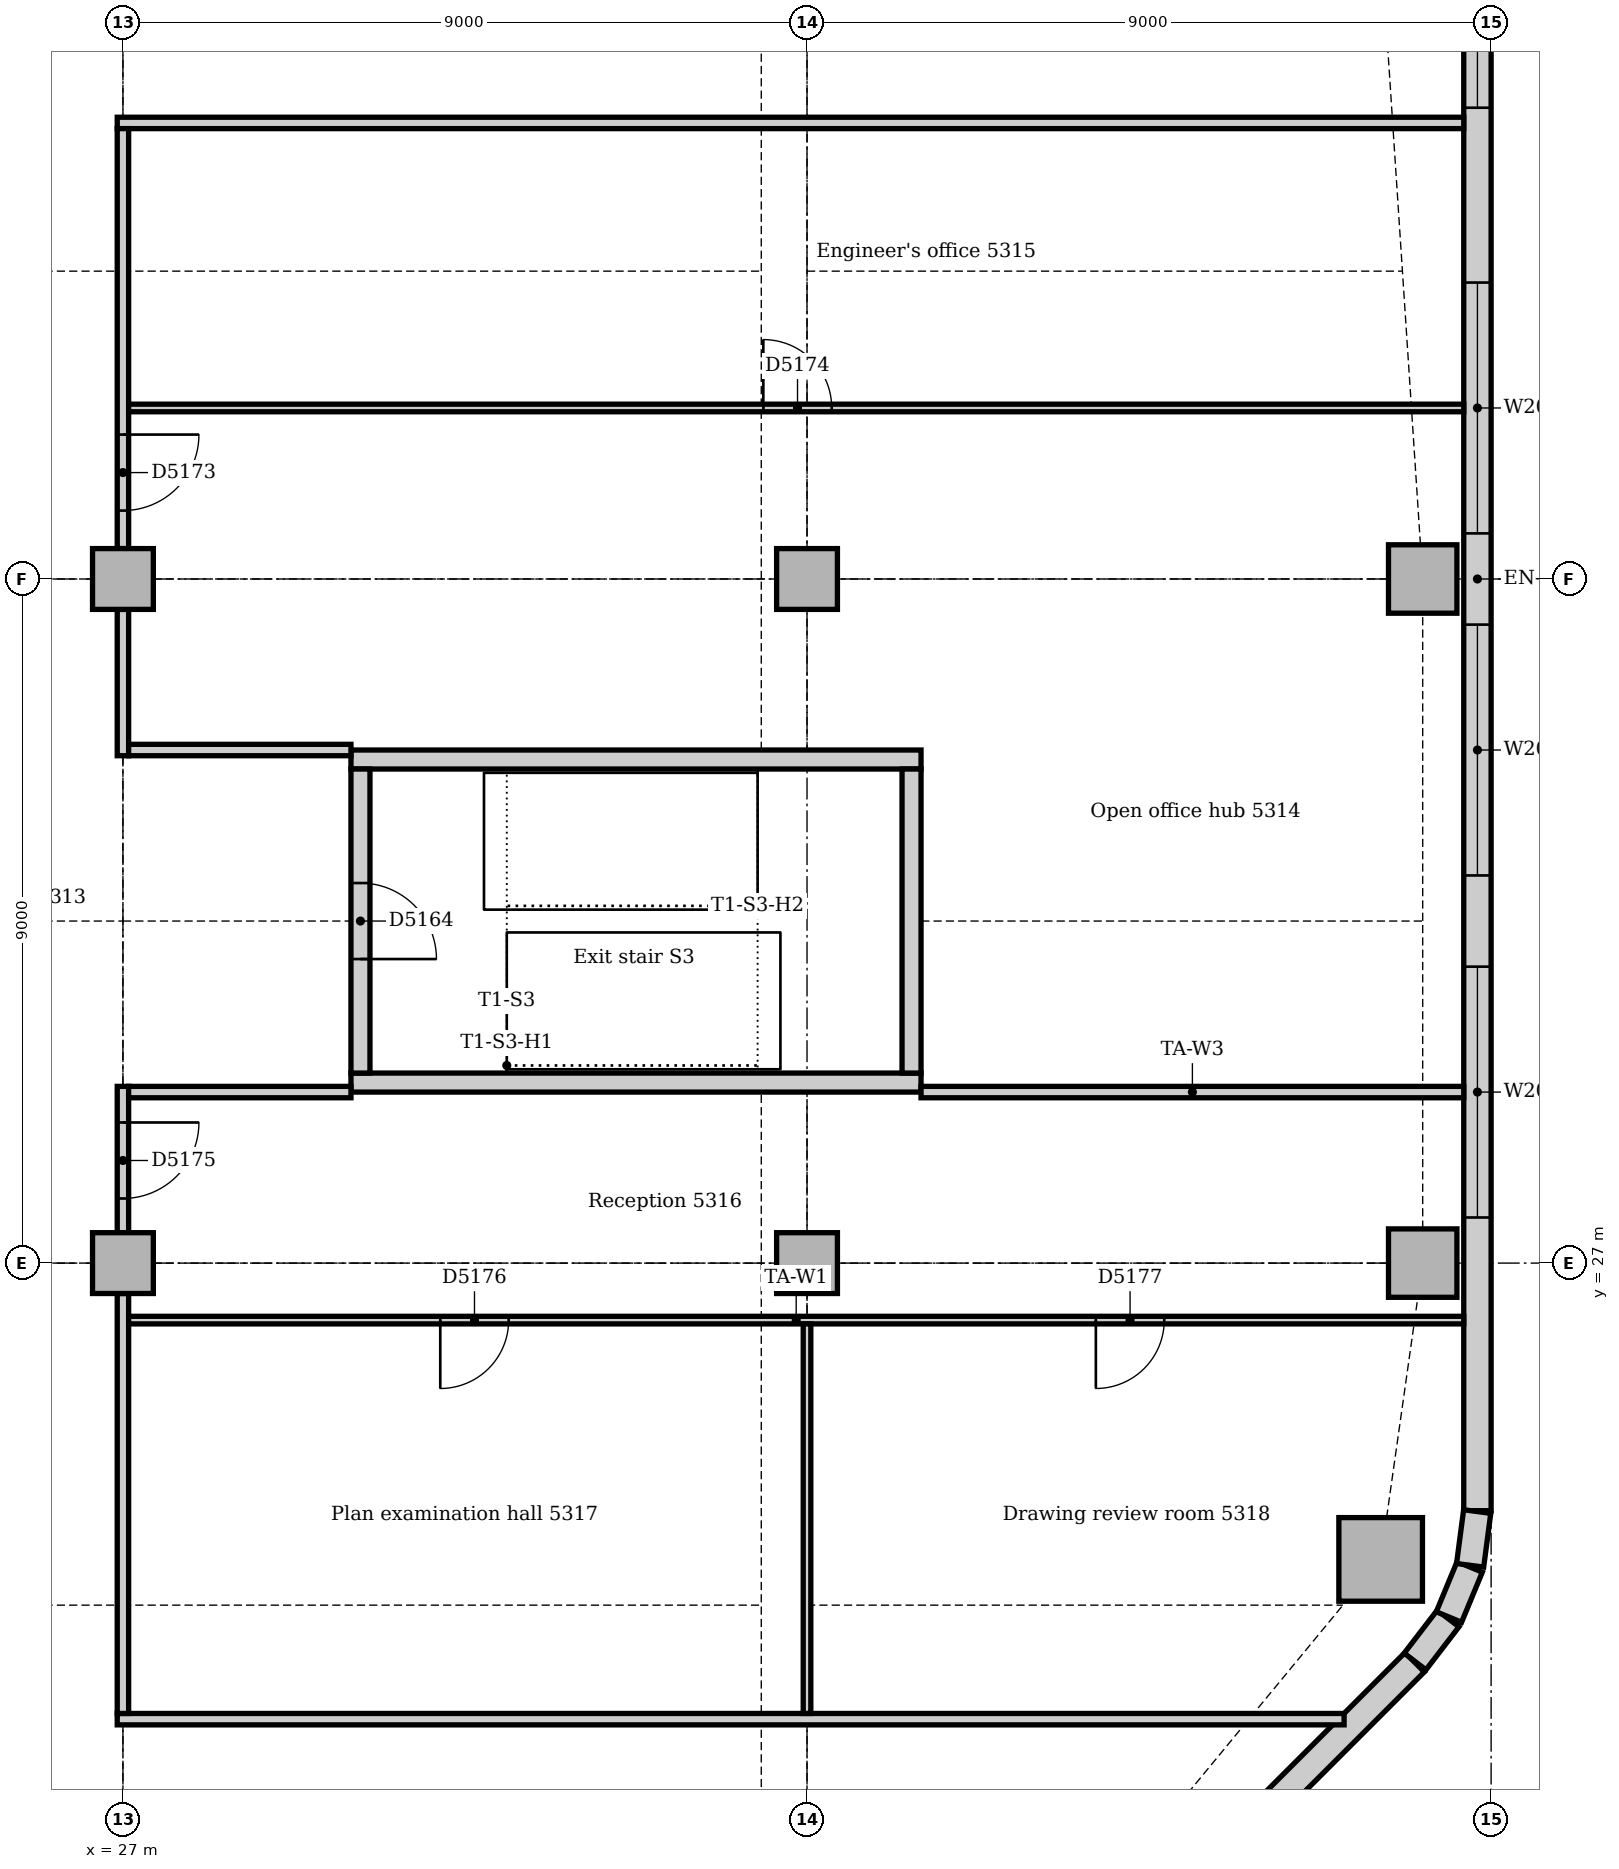
"""IFC4 building model, lengths in metres.
Left out: names, types, materials, properties, quantities, classifications, styles, units other than length and angle.
Written with IfcOpenShell. Run it as: python <this file> out.ifc"""

import sys

from ifc_helpers import new_model, si_unit, direction, frame, frame_2d, origin, origin_2d, place, context, subcontext, project, spatial, rectangle, extrude, element, fill, save


model = new_model("IFC4")
c1 = context("Model", 3, precision=1e-05, world=origin(), true_north=direction((0.0, 1.0)))
c2 = subcontext(c1, "Body", "Model", "MODEL_VIEW")
j1 = project(units=[si_unit("LENGTHUNIT", "METRE"), si_unit("PLANEANGLEUNIT", "RADIAN")], contexts=[c1])
p1 = place(None, origin())
s1 = spatial("IfcSite", under=j1, at=p1, CompositionType="ELEMENT")
p2 = place(p1, origin())
s2 = spatial("IfcBuilding", under=s1, at=p2, CompositionType="ELEMENT")
p3 = place(p2, frame((0.0, 0.0, 222.0)))
s3 = spatial("IfcBuildingStorey", under=s2, at=p3, CompositionType="ELEMENT", Elevation=222.0)
for number, where, z_axis, x_axis in (
    (1, (30.0, 29.375, 0.0), (0.0, 0.0, 1.0), (1.0, 0.0, 0.0)),
    (2, (37.5, 33.625, 0.0), (0.0, 0.0, 1.0), (-1.0, 0.0, 0.0)),
):
    element("IfcWall", number, at=place(p3, frame(where, z_axis=z_axis, x_axis=x_axis)), inside=s3, PredefinedType="SOLIDWALL", context=c2, shape_type="SweptSolid", body=[
        extrude(rectangle(XDim=7.5, YDim=0.25, at=frame_2d((3.75, 0.0))), origin(), (0.0, 0.0, 1.0), 4.0),
    ])
p4 = place(p3, frame((37.375, 29.5, 0.0), z_axis=(0.0, 0.0, 1.0), x_axis=(0.0, 1.0, 0.0)))
e3 = element("IfcWall", 3, at=p4, inside=s3, PredefinedType="SOLIDWALL", context=c2, shape_type="SweptSolid", body=[
    extrude(rectangle(XDim=4.0, YDim=0.25, at=frame_2d((2.0, 0.0))), origin(), (0.0, 0.0, 1.0), 4.0),
])
p5 = place(p3, frame((30.125, 33.5, 0.0), z_axis=(0.0, 0.0, 1.0), x_axis=(0.0, -1.0, 0.0)))
e4 = element("IfcWall", 4, at=p5, inside=s3, PredefinedType="SOLIDWALL", context=c2, shape_type="SweptSolid", body=[
    extrude(rectangle(XDim=4.0, YDim=0.25, at=frame_2d((2.0, 0.0))), origin(), (0.0, 0.0, 1.0), 4.0),
])
p6 = place(p5, frame((1.5, 0.0, 0.0)))
e5 = element("IfcOpeningElement", 5, at=p6, cuts=e4, PredefinedType="OPENING", context=c2, shape_type="SweptSolid", body=[
    extrude(rectangle(XDim=1.0, YDim=2.1, at=frame_2d((0.5, 1.05))), frame((0.0, 0.135, 0.0), z_axis=(0.0, -1.0, 0.0), x_axis=(1.0, 0.0, 0.0)), (0.0, 0.0, 1.0), 0.27),
])
p7 = place(p3, frame((43.547, 23.102, 0.0), z_axis=(0.0, 0.0, 1.0), x_axis=(1.0, 0.0, 0.0)))
e6 = element("IfcColumn", 6, at=p7, inside=s3, PredefinedType="COLUMN", context=c2, shape_type="SweptSolid", body=[
    extrude(rectangle(XDim=1.1, YDim=1.1, at=origin_2d()), origin(), (0.0, 0.0, 1.0), 3.85),
])
for number, where, z_axis, x_axis in (
    (7, (44.1, 27.0, 0.0), (0.0, 0.0, 1.0), (1.0, 0.0, 0.0)),
    (8, (44.1, 36.0, 0.0), (0.0, 0.0, 1.0), (1.0, 0.0, 0.0)),
):
    element("IfcColumn", number, at=place(p3, frame(where, z_axis=z_axis, x_axis=x_axis)), inside=s3, PredefinedType="COLUMN", context=c2, shape_type="SweptSolid", body=[
        extrude(rectangle(XDim=0.9, YDim=0.9, at=origin_2d()), origin(), (0.0, 0.0, 1.0), 3.85),
    ])
for number, where, z_axis, x_axis in (
    (9, (27.0, 27.0, 0.0), (0.0, 0.0, 1.0), (1.0, 0.0, 0.0)),
    (10, (27.0, 36.0, 0.0), (0.0, 0.0, 1.0), (1.0, 0.0, 0.0)),
    (11, (36.0, 27.0, 0.0), (0.0, 0.0, 1.0), (1.0, 0.0, 0.0)),
    (12, (36.0, 36.0, 0.0), (0.0, 0.0, 1.0), (1.0, 0.0, 0.0)),
):
    element("IfcColumn", number, at=place(p3, frame(where, z_axis=z_axis, x_axis=x_axis)), inside=s3, PredefinedType="COLUMN", context=c2, shape_type="SweptSolid", body=[
        extrude(rectangle(XDim=0.8, YDim=0.8, at=origin_2d()), origin(), (0.0, 0.0, 1.0), 3.85),
    ])
p8 = place(p3, frame((36.751, 14.506, 0.0), z_axis=(0.0, 0.0, 1.0), x_axis=(0.707106781187, 0.707106781187, 0.0)))
e13 = element("IfcWall", 13, at=p8, inside=s3, PredefinedType="STANDARD", context=c2, shape_type="SweptSolid", body=[
    extrude(rectangle(XDim=10.243, YDim=0.36, at=frame_2d((5.121, 0.0))), origin(), (0.0, 0.0, 1.0), 3.85),
])
p9 = place(p8, frame((5.021, 0.0, 0.9)))
e14 = element("IfcOpeningElement", 14, at=p9, cuts=e13, PredefinedType="OPENING", context=c2, shape_type="SweptSolid", body=[
    extrude(rectangle(XDim=1.8, YDim=1.6, at=frame_2d((0.9, 0.8))), frame((0.0, 0.19, 0.0), z_axis=(0.0, -1.0, 0.0), x_axis=(1.0, 0.0, 0.0)), (0.0, 0.0, 1.0), 0.38),
])
p10 = place(p3, frame((44.82, 23.743, 0.0), z_axis=(0.0, 0.0, 1.0), x_axis=(0.0, 1.0, 0.0)))
e15 = element("IfcWall", 15, at=p10, inside=s3, PredefinedType="STANDARD", context=c2, shape_type="SweptSolid", body=[
    extrude(rectangle(XDim=24.515, YDim=0.36, at=frame_2d((12.257, 0.0))), origin(), (0.0, 0.0, 1.0), 3.85),
])
p11 = place(p10, frame((3.857, 0.0, 0.9)))
e16 = element("IfcOpeningElement", 16, at=p11, cuts=e15, PredefinedType="OPENING", context=c2, shape_type="SweptSolid", body=[
    extrude(rectangle(XDim=3.3, YDim=1.6, at=frame_2d((1.65, 0.8))), frame((0.0, 0.19, 0.0), z_axis=(0.0, -1.0, 0.0), x_axis=(1.0, 0.0, 0.0)), (0.0, 0.0, 1.0), 0.38),
])
p12 = place(p10, frame((8.357, 0.0, 0.9)))
e17 = element("IfcOpeningElement", 17, at=p12, cuts=e15, PredefinedType="OPENING", context=c2, shape_type="SweptSolid", body=[
    extrude(rectangle(XDim=3.3, YDim=1.6, at=frame_2d((1.65, 0.8))), frame((0.0, 0.19, 0.0), z_axis=(0.0, -1.0, 0.0), x_axis=(1.0, 0.0, 0.0)), (0.0, 0.0, 1.0), 0.38),
])
p13 = place(p10, frame((12.857, 0.0, 0.9)))
e18 = element("IfcOpeningElement", 18, at=p13, cuts=e15, PredefinedType="OPENING", context=c2, shape_type="SweptSolid", body=[
    extrude(rectangle(XDim=3.3, YDim=1.6, at=frame_2d((1.65, 0.8))), frame((0.0, 0.19, 0.0), z_axis=(0.0, -1.0, 0.0), x_axis=(1.0, 0.0, 0.0)), (0.0, 0.0, 1.0), 0.38),
])
p14 = place(p10, frame((18.457, 0.0, 0.9)))
e19 = element("IfcOpeningElement", 19, at=p14, cuts=e15, PredefinedType="OPENING", context=c2, shape_type="SweptSolid", body=[
    extrude(rectangle(XDim=1.8, YDim=1.6, at=frame_2d((0.9, 0.8))), frame((0.0, 0.19, 0.0), z_axis=(0.0, -1.0, 0.0), x_axis=(1.0, 0.0, 0.0)), (0.0, 0.0, 1.0), 0.38),
])
p15 = place(p3, frame((44.0, 21.759, 0.0), z_axis=(0.0, 0.0, 1.0), x_axis=(0.608802368033, 0.793321924995, 0.0)))
e20 = element("IfcWall", 20, at=p15, inside=s3, PredefinedType="STANDARD", context=c2, shape_type="SweptSolid", body=[
    extrude(rectangle(XDim=0.713, YDim=0.36, at=frame_2d((0.357, 0.0))), origin(), (0.0, 0.0, 1.0), 3.85),
])
for number, where, z_axis, x_axis in (
    (21, (44.445, 22.344, 0.0), (0.0, 0.0, 1.0), (0.383, 0.924, 0.0)),
    (22, (44.724, 23.024, 0.0), (0.0, 0.0, 1.0), (0.131, 0.991, 0.0)),
):
    element("IfcWall", number, at=place(p3, frame(where, z_axis=z_axis, x_axis=x_axis)), inside=s3, PredefinedType="STANDARD", context=c2, shape_type="SweptSolid", body=[
        extrude(rectangle(XDim=0.713, YDim=0.36, at=frame_2d((0.356, 0.0))), origin(), (0.0, 0.0, 1.0), 3.85),
    ])
p16 = place(p3, frame((26.925, 42.0, 0.0), z_axis=(0.0, 0.0, 1.0), x_axis=(1.0, 0.0, 0.0)))
e23 = element("IfcWall", 23, at=p16, inside=s3, PredefinedType="PARTITIONING", context=c2, shape_type="SweptSolid", body=[
    extrude(rectangle(XDim=17.715, YDim=0.15, at=frame_2d((8.857, 0.0))), origin(), (0.0, 0.0, 1.0), 3.85),
])
p17 = place(p3, frame((26.925, 21.0, 0.0), z_axis=(0.0, 0.0, 1.0), x_axis=(1.0, 0.0, 0.0)))
e24 = element("IfcWall", 24, at=p17, inside=s3, PredefinedType="PARTITIONING", context=c2, shape_type="SweptSolid", body=[
    extrude(rectangle(XDim=16.141, YDim=0.15, at=frame_2d((8.07, 0.0))), origin(), (0.0, 0.0, 1.0), 3.85),
])
p18 = place(p3, frame((27.0, 21.075, 0.0), z_axis=(0.0, 0.0, 1.0), x_axis=(0.0, 1.0, 0.0)))
e25 = element("IfcWall", 25, at=p18, inside=s3, PredefinedType="PARTITIONING", context=c2, shape_type="SweptSolid", body=[
    extrude(rectangle(XDim=5.525, YDim=0.15, at=frame_2d((2.763, 0.0))), origin(), (0.0, 0.0, 1.0), 3.35),
])
p19 = place(p3, frame((27.0, 27.4, 0.0), z_axis=(0.0, 0.0, 1.0), x_axis=(0.0, 1.0, 0.0)))
e26 = element("IfcWall", 26, at=p19, inside=s3, PredefinedType="PARTITIONING", context=c2, shape_type="SweptSolid", body=[
    extrude(rectangle(XDim=1.925, YDim=0.15, at=frame_2d((0.963, 0.0))), origin(), (0.0, 0.0, 1.0), 3.35),
])
p20 = place(p19, frame((0.45, 0.0, 0.0)))
e27 = element("IfcOpeningElement", 27, at=p20, cuts=e26, PredefinedType="OPENING", context=c2, shape_type="SweptSolid", body=[
    extrude(rectangle(XDim=1.0, YDim=2.1, at=frame_2d((0.5, 1.05))), frame((0.0, 0.085, 0.0), z_axis=(0.0, -1.0, 0.0), x_axis=(1.0, 0.0, 0.0)), (0.0, 0.0, 1.0), 0.17),
])
p21 = place(p3, frame((27.0, 33.675, 0.0), z_axis=(0.0, 0.0, 1.0), x_axis=(0.0, 1.0, 0.0)))
e28 = element("IfcWall", 28, at=p21, inside=s3, PredefinedType="PARTITIONING", context=c2, shape_type="SweptSolid", body=[
    extrude(rectangle(XDim=1.925, YDim=0.15, at=frame_2d((0.963, 0.0))), origin(), (0.0, 0.0, 1.0), 3.35),
])
p22 = place(p3, frame((27.0, 36.4, 0.0), z_axis=(0.0, 0.0, 1.0), x_axis=(0.0, 1.0, 0.0)))
e29 = element("IfcWall", 29, at=p22, inside=s3, PredefinedType="PARTITIONING", context=c2, shape_type="SweptSolid", body=[
    extrude(rectangle(XDim=5.525, YDim=0.15, at=frame_2d((2.763, 0.0))), origin(), (0.0, 0.0, 1.0), 3.35),
])
p23 = place(p22, frame((0.5, 0.0, 0.0)))
e30 = element("IfcOpeningElement", 30, at=p23, cuts=e29, PredefinedType="OPENING", context=c2, shape_type="SweptSolid", body=[
    extrude(rectangle(XDim=1.0, YDim=2.1, at=frame_2d((0.5, 1.05))), frame((0.0, 0.085, 0.0), z_axis=(0.0, -1.0, 0.0), x_axis=(1.0, 0.0, 0.0)), (0.0, 0.0, 1.0), 0.17),
])
for number, where, z_axis, x_axis in (
    (31, (27.075, 29.25, 0.0), (0.0, 0.0, 1.0), (1.0, 0.0, 0.0)),
    (32, (27.075, 33.75, 0.0), (0.0, 0.0, 1.0), (1.0, 0.0, 0.0)),
):
    element("IfcWall", number, at=place(p3, frame(where, z_axis=z_axis, x_axis=x_axis)), inside=s3, PredefinedType="PARTITIONING", context=c2, shape_type="SweptSolid", body=[
        extrude(rectangle(XDim=2.925, YDim=0.15, at=frame_2d((1.462, 0.0))), origin(), (0.0, 0.0, 1.0), 3.85),
    ])
p24 = place(p3, frame((37.5, 29.25, 0.0), z_axis=(0.0, 0.0, 1.0), x_axis=(1.0, 0.0, 0.0)))
e33 = element("IfcWall", 33, at=p24, inside=s3, PredefinedType="PARTITIONING", context=c2, shape_type="SweptSolid", body=[
    extrude(rectangle(XDim=7.14, YDim=0.15, at=frame_2d((3.57, 0.0))), origin(), (0.0, 0.0, 1.0), 3.85),
])
p25 = place(p3, frame((27.075, 26.25, 0.0), z_axis=(0.0, 0.0, 1.0), x_axis=(1.0, 0.0, 0.0)))
e34 = element("IfcWall", 34, at=p25, inside=s3, PredefinedType="PARTITIONING", context=c2, shape_type="SweptSolid", body=[
    extrude(rectangle(XDim=17.565, YDim=0.1, at=frame_2d((8.783, 0.0))), origin(), (0.0, 0.0, 1.0), 3.85),
])
p26 = place(p25, frame((4.1, 0.0, 0.0)))
e35 = element("IfcOpeningElement", 35, at=p26, cuts=e34, PredefinedType="OPENING", context=c2, shape_type="SweptSolid", body=[
    extrude(rectangle(XDim=0.9, YDim=2.1, at=frame_2d((0.45, 1.05))), frame((0.0, 0.06, 0.0), z_axis=(0.0, -1.0, 0.0), x_axis=(1.0, 0.0, 0.0)), (0.0, 0.0, 1.0), 0.12),
])
p27 = place(p25, frame((12.725, 0.0, 0.0)))
e36 = element("IfcOpeningElement", 36, at=p27, cuts=e34, PredefinedType="OPENING", context=c2, shape_type="SweptSolid", body=[
    extrude(rectangle(XDim=0.9, YDim=2.1, at=frame_2d((0.45, 1.05))), frame((0.0, 0.06, 0.0), z_axis=(0.0, -1.0, 0.0), x_axis=(1.0, 0.0, 0.0)), (0.0, 0.0, 1.0), 0.12),
])
p28 = place(p3, frame((27.075, 38.25, 0.0), z_axis=(0.0, 0.0, 1.0), x_axis=(1.0, 0.0, 0.0)))
e37 = element("IfcWall", 37, at=p28, inside=s3, PredefinedType="PARTITIONING", context=c2, shape_type="SweptSolid", body=[
    extrude(rectangle(XDim=17.565, YDim=0.1, at=frame_2d((8.783, 0.0))), origin(), (0.0, 0.0, 1.0), 3.85),
])
p29 = place(p28, frame((8.35, 0.0, 0.0)))
e38 = element("IfcOpeningElement", 38, at=p29, cuts=e37, PredefinedType="OPENING", context=c2, shape_type="SweptSolid", body=[
    extrude(rectangle(XDim=0.9, YDim=2.1, at=frame_2d((0.45, 1.05))), frame((0.0, 0.06, 0.0), z_axis=(0.0, -1.0, 0.0), x_axis=(1.0, 0.0, 0.0)), (0.0, 0.0, 1.0), 0.12),
])
p30 = place(p3, frame((36.0, 21.075, 0.0), z_axis=(0.0, 0.0, 1.0), x_axis=(0.0, 1.0, 0.0)))
e39 = element("IfcWall", 39, at=p30, inside=s3, PredefinedType="PARTITIONING", context=c2, shape_type="SweptSolid", body=[
    extrude(rectangle(XDim=5.125, YDim=0.1, at=frame_2d((2.562, 0.0))), origin(), (0.0, 0.0, 1.0), 3.35),
])
p31 = place(p11, origin())
e40 = element("IfcWindow", 40, at=p31, inside=s3, PartitioningType="SINGLE_PANEL", PredefinedType="WINDOW", context=c2, shape_type="SweptSolid", body=[
    extrude(rectangle(XDim=3.3, YDim=1.6, at=frame_2d((1.65, 0.8))), frame((0.0, 0.13, 0.0), z_axis=(0.0, -1.0, 0.0), x_axis=(1.0, 0.0, 0.0)), (0.0, 0.0, 1.0), 0.06),
])
fill(e16, e40)
p32 = place(p12, origin())
e41 = element("IfcWindow", 41, at=p32, inside=s3, PartitioningType="SINGLE_PANEL", PredefinedType="WINDOW", context=c2, shape_type="SweptSolid", body=[
    extrude(rectangle(XDim=3.3, YDim=1.6, at=frame_2d((1.65, 0.8))), frame((0.0, 0.13, 0.0), z_axis=(0.0, -1.0, 0.0), x_axis=(1.0, 0.0, 0.0)), (0.0, 0.0, 1.0), 0.06),
])
fill(e17, e41)
p33 = place(p13, origin())
e42 = element("IfcWindow", 42, at=p33, inside=s3, PartitioningType="SINGLE_PANEL", PredefinedType="WINDOW", context=c2, shape_type="SweptSolid", body=[
    extrude(rectangle(XDim=3.3, YDim=1.6, at=frame_2d((1.65, 0.8))), frame((0.0, 0.13, 0.0), z_axis=(0.0, -1.0, 0.0), x_axis=(1.0, 0.0, 0.0)), (0.0, 0.0, 1.0), 0.06),
])
fill(e18, e42)
p34 = place(p14, origin())
e43 = element("IfcWindow", 43, at=p34, inside=s3, PartitioningType="SINGLE_PANEL", PredefinedType="WINDOW", context=c2, shape_type="SweptSolid", body=[
    extrude(rectangle(XDim=1.8, YDim=1.6, at=frame_2d((0.9, 0.8))), frame((0.0, 0.13, 0.0), z_axis=(0.0, -1.0, 0.0), x_axis=(1.0, 0.0, 0.0)), (0.0, 0.0, 1.0), 0.06),
])
fill(e19, e43)
p35 = place(p6, origin())
e44 = element("IfcDoor", 44, at=p35, inside=s3, OperationType="SINGLE_SWING_RIGHT", PredefinedType="DOOR", context=c2, shape_type="SweptSolid", body=[
    extrude(rectangle(XDim=1.0, YDim=2.1, at=frame_2d((0.5, 1.05))), frame((0.0, 0.025, 0.0), z_axis=(0.0, -1.0, 0.0), x_axis=(1.0, 0.0, 0.0)), (0.0, 0.0, 1.0), 0.05),
])
fill(e5, e44)
p36 = place(p23, frame((1.0, 0.0, 0.0), z_axis=(0.0, 0.0, 1.0), x_axis=(-1.0, 0.0, 0.0)))
e45 = element("IfcDoor", 45, at=p36, inside=s3, OperationType="SINGLE_SWING_LEFT", PredefinedType="DOOR", context=c2, shape_type="SweptSolid", body=[
    extrude(rectangle(XDim=1.0, YDim=2.1, at=frame_2d((0.5, 1.05))), frame((0.0, 0.025, 0.0), z_axis=(0.0, -1.0, 0.0), x_axis=(1.0, 0.0, 0.0)), (0.0, 0.0, 1.0), 0.05),
])
fill(e30, e45)
p37 = place(p29, origin())
e46 = element("IfcDoor", 46, at=p37, inside=s3, OperationType="SINGLE_SWING_LEFT", PredefinedType="DOOR", context=c2, shape_type="SweptSolid", body=[
    extrude(rectangle(XDim=0.9, YDim=2.1, at=frame_2d((0.45, 1.05))), frame((0.0, 0.025, 0.0), z_axis=(0.0, -1.0, 0.0), x_axis=(1.0, 0.0, 0.0)), (0.0, 0.0, 1.0), 0.05),
])
fill(e38, e46)
p38 = place(p20, frame((1.0, 0.0, 0.0), z_axis=(0.0, 0.0, 1.0), x_axis=(-1.0, 0.0, 0.0)))
e47 = element("IfcDoor", 47, at=p38, inside=s3, OperationType="SINGLE_SWING_LEFT", PredefinedType="DOOR", context=c2, shape_type="SweptSolid", body=[
    extrude(rectangle(XDim=1.0, YDim=2.1, at=frame_2d((0.5, 1.05))), frame((0.0, 0.025, 0.0), z_axis=(0.0, -1.0, 0.0), x_axis=(1.0, 0.0, 0.0)), (0.0, 0.0, 1.0), 0.05),
])
fill(e27, e47)
p39 = place(p26, frame((0.9, 0.0, 0.0), z_axis=(0.0, 0.0, 1.0), x_axis=(-1.0, 0.0, 0.0)))
e48 = element("IfcDoor", 48, at=p39, inside=s3, OperationType="SINGLE_SWING_RIGHT", PredefinedType="DOOR", context=c2, shape_type="SweptSolid", body=[
    extrude(rectangle(XDim=0.9, YDim=2.1, at=frame_2d((0.45, 1.05))), frame((0.0, 0.025, 0.0), z_axis=(0.0, -1.0, 0.0), x_axis=(1.0, 0.0, 0.0)), (0.0, 0.0, 1.0), 0.05),
])
fill(e35, e48)
p40 = place(p27, frame((0.9, 0.0, 0.0), z_axis=(0.0, 0.0, 1.0), x_axis=(-1.0, 0.0, 0.0)))
e49 = element("IfcDoor", 49, at=p40, inside=s3, OperationType="SINGLE_SWING_RIGHT", PredefinedType="DOOR", context=c2, shape_type="SweptSolid", body=[
    extrude(rectangle(XDim=0.9, YDim=2.1, at=frame_2d((0.45, 1.05))), frame((0.0, 0.025, 0.0), z_axis=(0.0, -1.0, 0.0), x_axis=(1.0, 0.0, 0.0)), (0.0, 0.0, 1.0), 0.05),
])
fill(e36, e49)
save(model, sys.argv[1])
